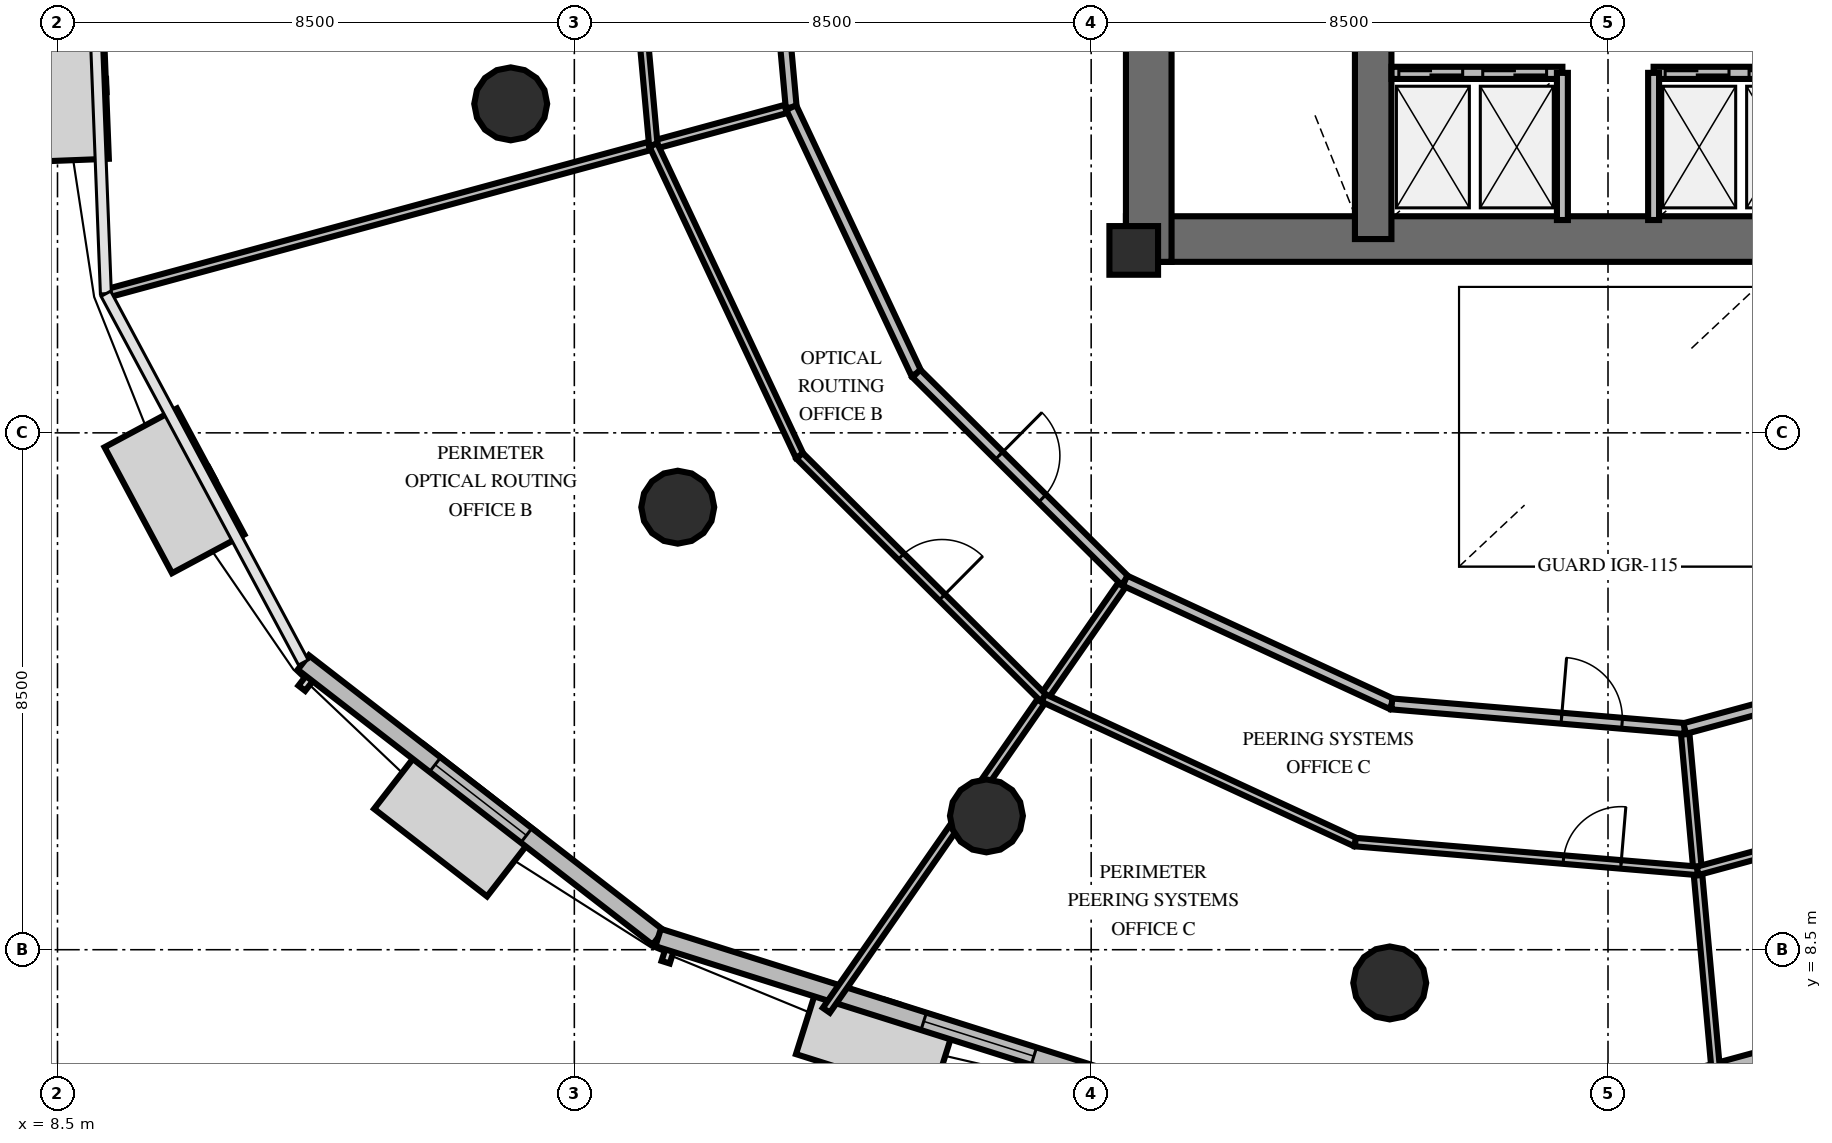
"""IFC4 building model, lengths in metres.
Left out: names, types, materials, properties, quantities, classifications, styles, units other than length and angle.
Written with IfcOpenShell. Run it as: python <this file> out.ifc"""

import sys

from ifc_helpers import new_model, si_unit, direction, frame, frame_2d, origin, origin_2d, place, context, subcontext, project, spatial, rectangle, circle, extrude, element, fill, save


model = new_model("IFC4")
c1 = context("Model", 3, precision=1e-05, world=origin(), true_north=direction((0.0, 1.0)))
c2 = subcontext(c1, "Body", "Model", "MODEL_VIEW")
j1 = project(units=[si_unit("LENGTHUNIT", "METRE"), si_unit("PLANEANGLEUNIT", "RADIAN")], contexts=[c1])
p1 = place(None, origin())
s1 = spatial("IfcSite", under=j1, at=p1, CompositionType="ELEMENT")
p2 = place(p1, origin())
s2 = spatial("IfcBuilding", under=s1, at=p2, CompositionType="ELEMENT")
p3 = place(p2, frame((0.0, 0.0, 97.8)))
s3 = spatial("IfcBuildingStorey", under=s2, at=p3, CompositionType="ELEMENT", Elevation=97.8)
p4 = place(p3, frame((26.072, 20.187, 0.0), z_axis=(0.0, 0.0, 1.0), x_axis=(1.0, 0.0, 0.0)))
e1 = element("IfcWall", 1, at=p4, inside=s3, PredefinedType="SHEAR", context=c2, shape_type="SweptSolid", body=[
    extrude(rectangle(XDim=15.866, YDim=0.75, at=frame_2d((7.933, 0.0))), origin(), (0.0, 0.0, 1.0), 4.0),
])
p5 = place(p3, frame((26.447, 19.812, 0.0), z_axis=(0.0, 0.0, 1.0), x_axis=(0.0, 1.0, 0.0)))
e2 = element("IfcWall", 2, at=p5, inside=s3, PredefinedType="SHEAR", context=c2, shape_type="SweptSolid", body=[
    extrude(rectangle(XDim=10.576, YDim=0.75, at=frame_2d((5.288, 0.0))), origin(), (0.0, 0.0, 1.0), 4.0),
])
p6 = place(p3, frame((30.138, 20.187, 0.0), z_axis=(0.0, 0.0, 1.0), x_axis=(0.0, 1.0, 0.0)))
e3 = element("IfcWall", 3, at=p6, inside=s3, PredefinedType="SHEAR", context=c2, shape_type="SweptSolid", body=[
    extrude(rectangle(XDim=9.826, YDim=0.6, at=frame_2d((4.913, 0.0))), origin(), (0.0, 0.0, 1.0), 4.0),
])
p7 = place(p3, frame((26.2, 20.0, 0.0), z_axis=(0.0, 0.0, 1.0), x_axis=(1.0, 0.0, 0.0)))
e4 = element("IfcColumn", 4, at=p7, inside=s3, PredefinedType="PILASTER", context=c2, shape_type="SweptSolid", body=[
    extrude(rectangle(XDim=0.8, YDim=0.8, at=origin_2d()), origin(), (0.0, 0.0, 1.0), 4.0),
])
for number, where, z_axis, x_axis in (
    (5, (15.954, 22.41, 0.0), (0.0, 0.0, 1.0), (1.0, 0.0, 0.0)),
    (6, (18.701, 15.778, 0.0), (0.0, 0.0, 1.0), (1.0, 0.0, 0.0)),
    (7, (23.778, 10.701, 0.0), (0.0, 0.0, 1.0), (1.0, 0.0, 0.0)),
    (8, (30.41, 7.954, 0.0), (0.0, 0.0, 1.0), (1.0, 0.0, 0.0)),
):
    element("IfcColumn", number, at=place(p3, frame(where, z_axis=z_axis, x_axis=x_axis)), inside=s3, PredefinedType="COLUMN", context=c2, shape_type="SweptSolid", body=[
        extrude(circle(Radius=0.6, at=origin_2d()), origin(), (0.0, 0.0, 1.0), 4.0),
    ])
p8 = place(p3, frame((12.543, 13.224, 0.0), z_axis=(0.0, 0.0, 1.0), x_axis=(0.79036781861, -0.61263260712, 0.0)))
e9 = element("IfcWall", 9, at=p8, inside=s3, PredefinedType="SOLIDWALL", context=c2, shape_type="SweptSolid", body=[
    extrude(rectangle(XDim=7.383, YDim=0.3, at=frame_2d((3.692, 0.0))), origin(), (0.0, 0.0, 1.0), 2.9),
])
p9 = place(p8, frame((2.742, 0.0, 0.8)))
e10 = element("IfcOpeningElement", 10, at=p9, cuts=e9, PredefinedType="OPENING", context=c2, shape_type="SweptSolid", body=[
    extrude(rectangle(XDim=1.9, YDim=1.95, at=frame_2d((0.95, 0.975))), frame((0.0, 0.16, 0.0), z_axis=(0.0, -1.0, 0.0), x_axis=(1.0, 0.0, 0.0)), (0.0, 0.0, 1.0), 0.32),
])
p10 = place(p3, frame((18.378, 8.7, 0.0), z_axis=(0.0, 0.0, 1.0), x_axis=(0.953619577743, -0.30101445305, 0.0)))
e11 = element("IfcWall", 11, at=p10, inside=s3, PredefinedType="SOLIDWALL", context=c2, shape_type="SweptSolid", body=[
    extrude(rectangle(XDim=8.095, YDim=0.3, at=frame_2d((4.048, 0.0))), origin(), (0.0, 0.0, 1.0), 2.9),
])
p11 = place(p10, frame((4.58, 0.0, 0.8)))
e12 = element("IfcOpeningElement", 12, at=p11, cuts=e11, PredefinedType="OPENING", context=c2, shape_type="SweptSolid", body=[
    extrude(rectangle(XDim=1.9, YDim=1.95, at=frame_2d((0.95, 0.975))), frame((0.0, 0.16, 0.0), z_axis=(0.0, -1.0, 0.0), x_axis=(1.0, 0.0, 0.0)), (0.0, 0.0, 1.0), 0.32),
])
p12 = place(p3, frame((34.771, 6.208, 0.0), z_axis=(0.0, 0.0, 1.0), x_axis=(0.965015591798, 0.26219250101, 0.0)))
e13 = element("IfcWall", 13, at=p12, inside=s3, PredefinedType="SOLIDWALL", context=c2, shape_type="SweptSolid", body=[
    extrude(rectangle(XDim=8.891, YDim=0.3, at=frame_2d((4.445, 0.0))), origin(), (0.0, 0.0, 1.0), 2.9),
])
p13 = place(p12, frame((6.43, 0.0, 0.0)))
e14 = element("IfcOpeningElement", 14, at=p13, cuts=e13, PredefinedType="OPENING", context=c2, shape_type="SweptSolid", body=[
    extrude(rectangle(XDim=1.05, YDim=2.15, at=frame_2d((0.525, 1.075))), frame((0.0, 0.16, 0.0), z_axis=(0.0, -1.0, 0.0), x_axis=(1.0, 0.0, 0.0)), (0.0, 0.0, 1.0), 0.32),
])
p14 = place(p3, frame((30.44, 22.92, 0.0), z_axis=(0.0, 0.0, 1.0), x_axis=(1.0, 0.0, 0.0)))
e15 = element("IfcWall", 15, at=p14, inside=s3, PredefinedType="SOLIDWALL", context=c2, shape_type="SweptSolid", body=[
    extrude(rectangle(XDim=2.81, YDim=0.2, at=frame_2d((1.405, 0.0))), origin(), (0.0, 0.0, 1.0), 2.8),
])
p15 = place(p14, frame((0.12, 0.0, 0.0)))
e16 = element("IfcOpeningElement", 16, at=p15, cuts=e15, PredefinedType="OPENING", context=c2, shape_type="SweptSolid", body=[
    extrude(rectangle(XDim=1.05, YDim=2.1, at=frame_2d((0.525, 1.05))), frame((0.0, 0.11, 0.0), z_axis=(0.0, -1.0, 0.0), x_axis=(1.0, 0.0, 0.0)), (0.0, 0.0, 1.0), 0.22),
])
p16 = place(p14, frame((1.5, 0.0, 0.0)))
e17 = element("IfcOpeningElement", 17, at=p16, cuts=e15, PredefinedType="OPENING", context=c2, shape_type="SweptSolid", body=[
    extrude(rectangle(XDim=1.05, YDim=2.1, at=frame_2d((0.525, 1.05))), frame((0.0, 0.11, 0.0), z_axis=(0.0, -1.0, 0.0), x_axis=(1.0, 0.0, 0.0)), (0.0, 0.0, 1.0), 0.22),
])
p17 = place(p3, frame((33.25, 20.5, 0.0), z_axis=(0.0, 0.0, 1.0), x_axis=(0.0, 1.0, 0.0)))
e18 = element("IfcWall", 18, at=p17, inside=s3, PredefinedType="SOLIDWALL", context=c2, shape_type="SweptSolid", body=[
    extrude(rectangle(XDim=2.42, YDim=0.18, at=frame_2d((1.21, 0.0))), origin(), (0.0, 0.0, 1.0), 2.8),
])
p18 = place(p3, frame((34.75, 22.92, 0.0), z_axis=(0.0, 0.0, 1.0), x_axis=(1.0, 0.0, 0.0)))
e19 = element("IfcWall", 19, at=p18, inside=s3, PredefinedType="SOLIDWALL", context=c2, shape_type="SweptSolid", body=[
    extrude(rectangle(XDim=2.81, YDim=0.2, at=frame_2d((1.405, 0.0))), origin(), (0.0, 0.0, 1.0), 2.8),
])
p19 = place(p18, frame((0.19, 0.0, 0.0)))
e20 = element("IfcOpeningElement", 20, at=p19, cuts=e19, PredefinedType="OPENING", context=c2, shape_type="SweptSolid", body=[
    extrude(rectangle(XDim=1.05, YDim=2.1, at=frame_2d((0.525, 1.05))), frame((0.0, 0.11, 0.0), z_axis=(0.0, -1.0, 0.0), x_axis=(1.0, 0.0, 0.0)), (0.0, 0.0, 1.0), 0.22),
])
p20 = place(p18, frame((1.57, 0.0, 0.0)))
e21 = element("IfcOpeningElement", 21, at=p20, cuts=e19, PredefinedType="OPENING", context=c2, shape_type="SweptSolid", body=[
    extrude(rectangle(XDim=1.05, YDim=2.1, at=frame_2d((0.525, 1.05))), frame((0.0, 0.11, 0.0), z_axis=(0.0, -1.0, 0.0), x_axis=(1.0, 0.0, 0.0)), (0.0, 0.0, 1.0), 0.22),
])
p21 = place(p3, frame((34.75, 20.5, 0.0), z_axis=(0.0, 0.0, 1.0), x_axis=(0.0, 1.0, 0.0)))
e22 = element("IfcWall", 22, at=p21, inside=s3, PredefinedType="SOLIDWALL", context=c2, shape_type="SweptSolid", body=[
    extrude(rectangle(XDim=2.42, YDim=0.18, at=frame_2d((1.21, 0.0))), origin(), (0.0, 0.0, 1.0), 2.8),
])
p22 = place(p3, frame((20.567, 22.35, 0.0), z_axis=(0.0, 0.0, 1.0), x_axis=(-0.965018061435, -0.262183411194, 0.0)))
e23 = element("IfcWall", 23, at=p22, inside=s3, PredefinedType="PARTITIONING", context=c2, shape_type="SweptSolid", body=[
    extrude(rectangle(XDim=11.68, YDim=0.14, at=frame_2d((5.84, 0.0))), origin(), (0.0, 0.0, 1.0), 2.8),
])
p23 = place(p3, frame((20.129, 27.165, 0.0), z_axis=(0.0, 0.0, 1.0), x_axis=(0.090599493513, -0.995887409186, 0.0)))
e24 = element("IfcWall", 24, at=p23, inside=s3, PredefinedType="PARTITIONING", context=c2, shape_type="SweptSolid", body=[
    extrude(rectangle(XDim=4.834, YDim=0.18, at=frame_2d((2.417, 0.0))), origin(), (0.0, 0.0, 1.0), 2.8),
])
p24 = place(p23, frame((1.034, 0.0, 0.0)))
e25 = element("IfcOpeningElement", 25, at=p24, cuts=e24, PredefinedType="OPENING", context=c2, shape_type="SweptSolid", body=[
    extrude(rectangle(XDim=1.0, YDim=2.15, at=frame_2d((0.5, 1.075))), frame((0.0, 0.1, 0.0), z_axis=(0.0, -1.0, 0.0), x_axis=(1.0, 0.0, 0.0)), (0.0, 0.0, 1.0), 0.2),
])
p25 = place(p3, frame((17.787, 27.361, 0.0), z_axis=(0.0, 0.0, 1.0), x_axis=(0.090648721683, -0.995882929494, 0.0)))
e26 = element("IfcWall", 26, at=p25, inside=s3, PredefinedType="PARTITIONING", context=c2, shape_type="SweptSolid", body=[
    extrude(rectangle(XDim=5.65, YDim=0.14, at=frame_2d((2.825, 0.0))), origin(), (0.0, 0.0, 1.0), 2.8),
])
p26 = place(p25, frame((1.265, 0.0, 0.0)))
e27 = element("IfcOpeningElement", 27, at=p26, cuts=e26, PredefinedType="OPENING", context=c2, shape_type="SweptSolid", body=[
    extrude(rectangle(XDim=0.95, YDim=2.15, at=frame_2d((0.475, 1.075))), frame((0.0, 0.08, 0.0), z_axis=(0.0, -1.0, 0.0), x_axis=(1.0, 0.0, 0.0)), (0.0, 0.0, 1.0), 0.16),
])
p27 = place(p3, frame((26.056, 14.57, 0.0), z_axis=(0.0, 0.0, 1.0), x_axis=(-0.570709473436, -0.821152054695, 0.0)))
e28 = element("IfcWall", 28, at=p27, inside=s3, PredefinedType="PARTITIONING", context=c2, shape_type="SweptSolid", body=[
    extrude(rectangle(XDim=8.605, YDim=0.14, at=frame_2d((4.302, 0.0))), origin(), (0.0, 0.0, 1.0), 2.8),
])
p28 = place(p3, frame((20.567, 22.35, 0.0), z_axis=(0.0, 0.0, 1.0), x_axis=(0.425775147607, -0.904829002453, 0.0)))
e29 = element("IfcWall", 29, at=p28, inside=s3, PredefinedType="PARTITIONING", context=c2, shape_type="SweptSolid", body=[
    extrude(rectangle(XDim=4.834, YDim=0.18, at=frame_2d((2.417, 0.0))), origin(), (0.0, 0.0, 1.0), 2.8),
])
p29 = place(p3, frame((22.625, 17.976, 0.0), z_axis=(0.0, 0.0, 1.0), x_axis=(0.709576956514, -0.704627946355, 0.0)))
e30 = element("IfcWall", 30, at=p29, inside=s3, PredefinedType="PARTITIONING", context=c2, shape_type="SweptSolid", body=[
    extrude(rectangle(XDim=4.834, YDim=0.18, at=frame_2d((2.417, 0.0))), origin(), (0.0, 0.0, 1.0), 2.8),
])
p30 = place(p29, frame((1.917, 0.0, 0.0)))
e31 = element("IfcOpeningElement", 31, at=p30, cuts=e30, PredefinedType="OPENING", context=c2, shape_type="SweptSolid", body=[
    extrude(rectangle(XDim=1.0, YDim=2.15, at=frame_2d((0.5, 1.075))), frame((0.0, 0.1, 0.0), z_axis=(0.0, -1.0, 0.0), x_axis=(1.0, 0.0, 0.0)), (0.0, 0.0, 1.0), 0.2),
])
p31 = place(p3, frame((18.299, 21.734, 0.0), z_axis=(0.0, 0.0, 1.0), x_axis=(0.425759581932, -0.904836326853, 0.0)))
e32 = element("IfcWall", 32, at=p31, inside=s3, PredefinedType="PARTITIONING", context=c2, shape_type="SweptSolid", body=[
    extrude(rectangle(XDim=5.651, YDim=0.14, at=frame_2d((2.825, 0.0))), origin(), (0.0, 0.0, 1.0), 2.8),
])
p32 = place(p3, frame((20.705, 16.621, 0.0), z_axis=(0.0, 0.0, 1.0), x_axis=(0.709586813131, -0.70461802037, 0.0)))
e33 = element("IfcWall", 33, at=p32, inside=s3, PredefinedType="PARTITIONING", context=c2, shape_type="SweptSolid", body=[
    extrude(rectangle(XDim=5.65, YDim=0.14, at=frame_2d((2.825, 0.0))), origin(), (0.0, 0.0, 1.0), 2.8),
])
p33 = place(p32, frame((2.35, 0.0, 0.0)))
e34 = element("IfcOpeningElement", 34, at=p33, cuts=e33, PredefinedType="OPENING", context=c2, shape_type="SweptSolid", body=[
    extrude(rectangle(XDim=0.95, YDim=2.15, at=frame_2d((0.475, 1.075))), frame((0.0, 0.08, 0.0), z_axis=(0.0, -1.0, 0.0), x_axis=(1.0, 0.0, 0.0)), (0.0, 0.0, 1.0), 0.16),
])
p34 = place(p3, frame((35.262, 12.137, 0.0), z_axis=(0.0, 0.0, 1.0), x_axis=(0.090615399913, -0.995885961995, 0.0)))
e35 = element("IfcWall", 35, at=p34, inside=s3, PredefinedType="PARTITIONING", context=c2, shape_type="SweptSolid", body=[
    extrude(rectangle(XDim=5.803, YDim=0.14, at=frame_2d((2.902, 0.0))), origin(), (0.0, 0.0, 1.0), 2.8),
])
p35 = place(p3, frame((26.056, 14.57, 0.0), z_axis=(0.0, 0.0, 1.0), x_axis=(0.907770094926, -0.419468061666, 0.0)))
e36 = element("IfcWall", 36, at=p35, inside=s3, PredefinedType="PARTITIONING", context=c2, shape_type="SweptSolid", body=[
    extrude(rectangle(XDim=4.834, YDim=0.18, at=frame_2d((2.417, 0.0))), origin(), (0.0, 0.0, 1.0), 2.8),
])
p36 = place(p3, frame((30.444, 12.542, 0.0), z_axis=(0.0, 0.0, 1.0), x_axis=(0.996492970022, -0.083676524164, 0.0)))
e37 = element("IfcWall", 37, at=p36, inside=s3, PredefinedType="PARTITIONING", context=c2, shape_type="SweptSolid", body=[
    extrude(rectangle(XDim=4.834, YDim=0.18, at=frame_2d((2.417, 0.0))), origin(), (0.0, 0.0, 1.0), 2.8),
])
p37 = place(p36, frame((2.801, 0.0, 0.0)))
e38 = element("IfcOpeningElement", 38, at=p37, cuts=e37, PredefinedType="OPENING", context=c2, shape_type="SweptSolid", body=[
    extrude(rectangle(XDim=1.0, YDim=2.15, at=frame_2d((0.5, 1.075))), frame((0.0, 0.1, 0.0), z_axis=(0.0, -1.0, 0.0), x_axis=(1.0, 0.0, 0.0)), (0.0, 0.0, 1.0), 0.2),
])
p38 = place(p3, frame((24.715, 12.64, 0.0), z_axis=(0.0, 0.0, 1.0), x_axis=(0.907777197452, -0.41945269076, 0.0)))
e39 = element("IfcWall", 39, at=p38, inside=s3, PredefinedType="PARTITIONING", context=c2, shape_type="SweptSolid", body=[
    extrude(rectangle(XDim=5.65, YDim=0.14, at=frame_2d((2.825, 0.0))), origin(), (0.0, 0.0, 1.0), 2.8),
])
p39 = place(p3, frame((29.844, 10.27, 0.0), z_axis=(0.0, 0.0, 1.0), x_axis=(0.996495215898, -0.083649774009, 0.0)))
e40 = element("IfcWall", 40, at=p39, inside=s3, PredefinedType="PARTITIONING", context=c2, shape_type="SweptSolid", body=[
    extrude(rectangle(XDim=5.65, YDim=0.14, at=frame_2d((2.825, 0.0))), origin(), (0.0, 0.0, 1.0), 2.8),
])
p40 = place(p39, frame((3.435, 0.0, 0.0)))
e41 = element("IfcOpeningElement", 41, at=p40, cuts=e40, PredefinedType="OPENING", context=c2, shape_type="SweptSolid", body=[
    extrude(rectangle(XDim=0.95, YDim=2.15, at=frame_2d((0.475, 1.075))), frame((0.0, 0.08, 0.0), z_axis=(0.0, -1.0, 0.0), x_axis=(1.0, 0.0, 0.0)), (0.0, 0.0, 1.0), 0.16),
])
p41 = place(p3, frame((35.262, 12.137, 0.0), z_axis=(0.0, 0.0, 1.0), x_axis=(0.965010471878, 0.262211344463, 0.0)))
e42 = element("IfcWall", 42, at=p41, inside=s3, PredefinedType="PARTITIONING", context=c2, shape_type="SweptSolid", body=[
    extrude(rectangle(XDim=4.834, YDim=0.18, at=frame_2d((2.417, 0.0))), origin(), (0.0, 0.0, 1.0), 2.8),
])
p42 = place(p41, frame((2.801, 0.0, 0.0)))
e43 = element("IfcOpeningElement", 43, at=p42, cuts=e42, PredefinedType="OPENING", context=c2, shape_type="SweptSolid", body=[
    extrude(rectangle(XDim=1.0, YDim=2.15, at=frame_2d((0.5, 1.075))), frame((0.0, 0.1, 0.0), z_axis=(0.0, -1.0, 0.0), x_axis=(1.0, 0.0, 0.0)), (0.0, 0.0, 1.0), 0.2),
])
p43 = place(p3, frame((35.475, 9.797, 0.0), z_axis=(0.0, 0.0, 1.0), x_axis=(0.96501961214, 0.262177703446, 0.0)))
e44 = element("IfcWall", 44, at=p43, inside=s3, PredefinedType="PARTITIONING", context=c2, shape_type="SweptSolid", body=[
    extrude(rectangle(XDim=5.651, YDim=0.14, at=frame_2d((2.825, 0.0))), origin(), (0.0, 0.0, 1.0), 2.8),
])
p44 = place(p43, frame((3.435, 0.0, 0.0)))
e45 = element("IfcOpeningElement", 45, at=p44, cuts=e44, PredefinedType="OPENING", context=c2, shape_type="SweptSolid", body=[
    extrude(rectangle(XDim=0.95, YDim=2.15, at=frame_2d((0.475, 1.075))), frame((0.0, 0.08, 0.0), z_axis=(0.0, -1.0, 0.0), x_axis=(1.0, 0.0, 0.0)), (0.0, 0.0, 1.0), 0.16),
])
p45 = place(p9, origin())
e46 = element("IfcWindow", 46, at=p45, inside=s3, PartitioningType="SINGLE_PANEL", PredefinedType="WINDOW", context=c2, shape_type="SweptSolid", body=[
    extrude(rectangle(XDim=1.9, YDim=1.95, at=frame_2d((0.95, 0.975))), frame((0.0, 0.03, 0.0), z_axis=(0.0, -1.0, 0.0), x_axis=(1.0, 0.0, 0.0)), (0.0, 0.0, 1.0), 0.06),
])
fill(e10, e46)
p46 = place(p11, origin())
e47 = element("IfcWindow", 47, at=p46, inside=s3, PartitioningType="SINGLE_PANEL", PredefinedType="WINDOW", context=c2, shape_type="SweptSolid", body=[
    extrude(rectangle(XDim=1.9, YDim=1.95, at=frame_2d((0.95, 0.975))), frame((0.0, 0.03, 0.0), z_axis=(0.0, -1.0, 0.0), x_axis=(1.0, 0.0, 0.0)), (0.0, 0.0, 1.0), 0.06),
])
fill(e12, e47)
p47 = place(p15, origin())
e48 = element("IfcDoor", 48, at=p47, inside=s3, OperationType="DOUBLE_DOOR_SLIDING", PredefinedType="USERDEFINED", context=c2, shape_type="SweptSolid", body=[
    extrude(rectangle(XDim=1.05, YDim=2.1, at=frame_2d((0.525, 1.05))), frame((0.0, 0.025, 0.0), z_axis=(0.0, -1.0, 0.0), x_axis=(1.0, 0.0, 0.0)), (0.0, 0.0, 1.0), 0.05),
])
fill(e16, e48)
p48 = place(p16, origin())
e49 = element("IfcDoor", 49, at=p48, inside=s3, OperationType="DOUBLE_DOOR_SLIDING", PredefinedType="USERDEFINED", context=c2, shape_type="SweptSolid", body=[
    extrude(rectangle(XDim=1.05, YDim=2.1, at=frame_2d((0.525, 1.05))), frame((0.0, 0.025, 0.0), z_axis=(0.0, -1.0, 0.0), x_axis=(1.0, 0.0, 0.0)), (0.0, 0.0, 1.0), 0.05),
])
fill(e17, e49)
p49 = place(p19, origin())
e50 = element("IfcDoor", 50, at=p49, inside=s3, OperationType="DOUBLE_DOOR_SLIDING", PredefinedType="USERDEFINED", context=c2, shape_type="SweptSolid", body=[
    extrude(rectangle(XDim=1.05, YDim=2.1, at=frame_2d((0.525, 1.05))), frame((0.0, 0.025, 0.0), z_axis=(0.0, -1.0, 0.0), x_axis=(1.0, 0.0, 0.0)), (0.0, 0.0, 1.0), 0.05),
])
fill(e20, e50)
p50 = place(p20, origin())
e51 = element("IfcDoor", 51, at=p50, inside=s3, OperationType="DOUBLE_DOOR_SLIDING", PredefinedType="USERDEFINED", context=c2, shape_type="SweptSolid", body=[
    extrude(rectangle(XDim=1.05, YDim=2.1, at=frame_2d((0.525, 1.05))), frame((0.0, 0.025, 0.0), z_axis=(0.0, -1.0, 0.0), x_axis=(1.0, 0.0, 0.0)), (0.0, 0.0, 1.0), 0.05),
])
fill(e21, e51)
p51 = place(p30, origin())
e52 = element("IfcDoor", 52, at=p51, inside=s3, OperationType="SINGLE_SWING_LEFT", PredefinedType="DOOR", context=c2, shape_type="SweptSolid", body=[
    extrude(rectangle(XDim=1.0, YDim=2.15, at=frame_2d((0.5, 1.075))), frame((0.0, 0.025, 0.0), z_axis=(0.0, -1.0, 0.0), x_axis=(1.0, 0.0, 0.0)), (0.0, 0.0, 1.0), 0.05),
])
fill(e31, e52)
p52 = place(p33, origin())
e53 = element("IfcDoor", 53, at=p52, inside=s3, OperationType="SINGLE_SWING_RIGHT", PredefinedType="DOOR", context=c2, shape_type="SweptSolid", body=[
    extrude(rectangle(XDim=0.95, YDim=2.15, at=frame_2d((0.475, 1.075))), frame((0.0, 0.025, 0.0), z_axis=(0.0, -1.0, 0.0), x_axis=(1.0, 0.0, 0.0)), (0.0, 0.0, 1.0), 0.05),
])
fill(e34, e53)
p53 = place(p37, origin())
e54 = element("IfcDoor", 54, at=p53, inside=s3, OperationType="SINGLE_SWING_LEFT", PredefinedType="DOOR", context=c2, shape_type="SweptSolid", body=[
    extrude(rectangle(XDim=1.0, YDim=2.15, at=frame_2d((0.5, 1.075))), frame((0.0, 0.025, 0.0), z_axis=(0.0, -1.0, 0.0), x_axis=(1.0, 0.0, 0.0)), (0.0, 0.0, 1.0), 0.05),
])
fill(e38, e54)
p54 = place(p40, origin())
e55 = element("IfcDoor", 55, at=p54, inside=s3, OperationType="SINGLE_SWING_RIGHT", PredefinedType="DOOR", context=c2, shape_type="SweptSolid", body=[
    extrude(rectangle(XDim=0.95, YDim=2.15, at=frame_2d((0.475, 1.075))), frame((0.0, 0.025, 0.0), z_axis=(0.0, -1.0, 0.0), x_axis=(1.0, 0.0, 0.0)), (0.0, 0.0, 1.0), 0.05),
])
fill(e41, e55)
save(model, sys.argv[1])
